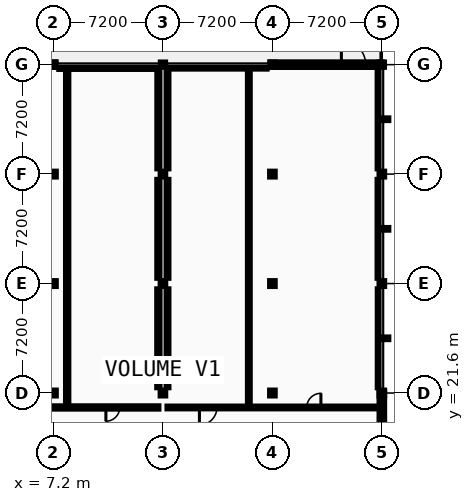
"""IFC4 building model, lengths in metres.
Left out: names, types, materials, properties, quantities, classifications, styles, units other than length and angle.
Written with IfcOpenShell. Run it as: python <this file> out.ifc"""

import sys

from ifc_helpers import new_model, si_unit, direction, frame, frame_2d, origin, origin_2d, place, context, subcontext, project, spatial, rectangle, i_section, extrude, element, fill, save


model = new_model("IFC4")
c1 = context("Model", 3, precision=1e-05, world=origin(), true_north=direction((0.0, 1.0)))
c2 = subcontext(c1, "Body", "Model", "MODEL_VIEW")
j1 = project(units=[si_unit("LENGTHUNIT", "METRE"), si_unit("PLANEANGLEUNIT", "RADIAN")], contexts=[c1])
p1 = place(None, origin())
s1 = spatial("IfcSite", under=j1, at=p1, CompositionType="ELEMENT")
p2 = place(p1, origin())
s2 = spatial("IfcBuilding", under=s1, at=p2, CompositionType="ELEMENT")
p3 = place(p2, frame((0.0, 0.0, 22.8)))
s3 = spatial("IfcBuildingStorey", under=s2, at=p3, CompositionType="ELEMENT", Elevation=22.8)
for number, where, z_axis, x_axis in (
    (1, (7.2, 21.6, 0.0), (0.0, 0.0, 1.0), (1.0, 0.0, 0.0)),
    (2, (7.2, 28.8, 0.0), (0.0, 0.0, 1.0), (1.0, 0.0, 0.0)),
    (3, (7.2, 36.0, 0.0), (0.0, 0.0, 1.0), (1.0, 0.0, 0.0)),
):
    element("IfcColumn", number, at=place(p3, frame(where, z_axis=z_axis, x_axis=x_axis)), inside=s3, PredefinedType="COLUMN", context=c2, shape_type="SweptSolid", body=[
        extrude(i_section(OverallWidth=0.3, OverallDepth=0.32, WebThickness=0.011, FlangeThickness=0.021, FilletRadius=0.027, at=origin_2d()), origin(), (0.0, 0.0, 1.0), 4.4),
    ])
p4 = place(p3, frame((7.2, 43.2, 0.0), z_axis=(0.0, 0.0, 1.0), x_axis=(1.0, 0.0, 0.0)))
e4 = element("IfcColumn", 4, at=p4, inside=s3, PredefinedType="COLUMN", context=c2, shape_type="SweptSolid", body=[
    extrude(i_section(OverallWidth=0.28, OverallDepth=0.28, WebThickness=0.01, FlangeThickness=0.018, FilletRadius=0.024, at=origin_2d()), origin(), (0.0, 0.0, 1.0), 4.4),
])
for number, where, z_axis, x_axis in (
    (5, (14.4, 21.6, 0.0), (0.0, 0.0, 1.0), (1.0, 0.0, 0.0)),
    (6, (14.4, 28.8, 0.0), (0.0, 0.0, 1.0), (1.0, 0.0, 0.0)),
    (7, (14.4, 36.0, 0.0), (0.0, 0.0, 1.0), (1.0, 0.0, 0.0)),
):
    element("IfcColumn", number, at=place(p3, frame(where, z_axis=z_axis, x_axis=x_axis)), inside=s3, PredefinedType="COLUMN", context=c2, shape_type="SweptSolid", body=[
        extrude(i_section(OverallWidth=0.3, OverallDepth=0.32, WebThickness=0.011, FlangeThickness=0.021, FilletRadius=0.027, at=origin_2d()), origin(), (0.0, 0.0, 1.0), 4.4),
    ])
p5 = place(p3, frame((14.4, 43.2, 0.0), z_axis=(0.0, 0.0, 1.0), x_axis=(1.0, 0.0, 0.0)))
e8 = element("IfcColumn", 8, at=p5, inside=s3, PredefinedType="COLUMN", context=c2, shape_type="SweptSolid", body=[
    extrude(i_section(OverallWidth=0.28, OverallDepth=0.28, WebThickness=0.01, FlangeThickness=0.018, FilletRadius=0.024, at=origin_2d()), origin(), (0.0, 0.0, 1.0), 4.4),
])
for number, where, z_axis, x_axis in (
    (9, (21.6, 21.6, 0.0), (0.0, 0.0, 1.0), (1.0, 0.0, 0.0)),
    (10, (21.6, 28.8, 0.0), (0.0, 0.0, 1.0), (1.0, 0.0, 0.0)),
    (11, (21.6, 36.0, 0.0), (0.0, 0.0, 1.0), (1.0, 0.0, 0.0)),
):
    element("IfcColumn", number, at=place(p3, frame(where, z_axis=z_axis, x_axis=x_axis)), inside=s3, PredefinedType="COLUMN", context=c2, shape_type="SweptSolid", body=[
        extrude(i_section(OverallWidth=0.3, OverallDepth=0.32, WebThickness=0.011, FlangeThickness=0.021, FilletRadius=0.027, at=origin_2d()), origin(), (0.0, 0.0, 1.0), 4.4),
    ])
p6 = place(p3, frame((21.6, 43.2, 0.0), z_axis=(0.0, 0.0, 1.0), x_axis=(1.0, 0.0, 0.0)))
e12 = element("IfcColumn", 12, at=p6, inside=s3, PredefinedType="COLUMN", context=c2, shape_type="SweptSolid", body=[
    extrude(i_section(OverallWidth=0.28, OverallDepth=0.28, WebThickness=0.01, FlangeThickness=0.018, FilletRadius=0.024, at=origin_2d()), origin(), (0.0, 0.0, 1.0), 4.4),
])
for number, where, z_axis, x_axis in (
    (13, (28.8, 21.6, 0.0), (0.0, 0.0, 1.0), (1.0, 0.0, 0.0)),
    (14, (28.8, 28.8, 0.0), (0.0, 0.0, 1.0), (1.0, 0.0, 0.0)),
    (15, (28.8, 36.0, 0.0), (0.0, 0.0, 1.0), (1.0, 0.0, 0.0)),
):
    element("IfcColumn", number, at=place(p3, frame(where, z_axis=z_axis, x_axis=x_axis)), inside=s3, PredefinedType="COLUMN", context=c2, shape_type="SweptSolid", body=[
        extrude(i_section(OverallWidth=0.3, OverallDepth=0.32, WebThickness=0.011, FlangeThickness=0.021, FilletRadius=0.027, at=origin_2d()), origin(), (0.0, 0.0, 1.0), 4.4),
    ])
p7 = place(p3, frame((28.8, 43.2, 0.0), z_axis=(0.0, 0.0, 1.0), x_axis=(1.0, 0.0, 0.0)))
e16 = element("IfcColumn", 16, at=p7, inside=s3, PredefinedType="COLUMN", context=c2, shape_type="SweptSolid", body=[
    extrude(i_section(OverallWidth=0.28, OverallDepth=0.28, WebThickness=0.01, FlangeThickness=0.018, FilletRadius=0.024, at=origin_2d()), origin(), (0.0, 0.0, 1.0), 4.4),
])
p8 = place(p3, frame((7.31, 43.2, 0.0), z_axis=(0.0, 0.0, 1.0), x_axis=(-1.0, 0.0, 0.0)))
e17 = element("IfcWall", 17, at=p8, inside=s3, PredefinedType="STANDARD", context=c2, shape_type="SweptSolid", body=[
    extrude(rectangle(XDim=7.46, YDim=0.3, at=frame_2d((3.73, 0.0))), origin(), (0.0, 0.0, 1.0), 3.915),
])
p9 = place(p3, frame((28.8, 43.2, 0.0), z_axis=(0.0, 0.0, 1.0), x_axis=(-1.0, 0.0, 0.0)))
e18 = element("IfcWall", 18, at=p9, inside=s3, PredefinedType="STANDARD", context=c2, shape_type="SweptSolid", body=[
    extrude(rectangle(XDim=7.31, YDim=0.3, at=frame_2d((3.655, 0.0))), origin(), (0.0, 0.0, 1.0), 3.915),
])
p10 = place(p9, frame((1.062, 0.0, 0.0)))
e19 = element("IfcOpeningElement", 19, at=p10, cuts=e18, PredefinedType="OPENING", context=c2, shape_type="SweptSolid", body=[
    extrude(rectangle(XDim=1.6, YDim=2.2, at=frame_2d((0.8, 1.1))), frame((0.0, 0.16, 0.0), z_axis=(0.0, -1.0, 0.0), x_axis=(1.0, 0.0, 0.0)), (0.0, 0.0, 1.0), 0.32),
])
p11 = place(p3, frame((28.8, 14.45, 0.0), z_axis=(0.0, 0.0, 1.0), x_axis=(0.0, 1.0, 0.0)))
e20 = element("IfcWall", 20, at=p11, inside=s3, PredefinedType="STANDARD", context=c2, shape_type="SweptSolid", body=[
    extrude(rectangle(XDim=7.15, YDim=0.3, at=frame_2d((3.575, 0.0))), origin(), (0.0, 0.0, 1.0), 4.215),
])
p12 = place(p3, frame((0.2, 20.65, 0.0), z_axis=(0.0, 0.0, 1.0), x_axis=(1.0, 0.0, 0.0)))
e21 = element("IfcWall", 21, at=p12, inside=s3, PredefinedType="PARTITIONING", context=c2, shape_type="SweptSolid", body=[
    extrude(rectangle(XDim=13.9, YDim=0.15, at=frame_2d((6.95, 0.0))), origin(), (0.0, 0.0, 1.0), 4.215),
])
p13 = place(p12, frame((1.97, 0.0, 0.0)))
e22 = element("IfcOpeningElement", 22, at=p13, cuts=e21, PredefinedType="OPENING", context=c2, shape_type="SweptSolid", body=[
    extrude(rectangle(XDim=0.88, YDim=2.096, at=frame_2d((0.44, 1.048))), frame((0.0, 0.085, 0.0), z_axis=(0.0, -1.0, 0.0), x_axis=(1.0, 0.0, 0.0)), (0.0, 0.0, 1.0), 0.17),
])
p14 = place(p12, frame((3.75, 0.0, 0.0)))
e23 = element("IfcOpeningElement", 23, at=p14, cuts=e21, PredefinedType="OPENING", context=c2, shape_type="SweptSolid", body=[
    extrude(rectangle(XDim=1.5, YDim=2.2, at=frame_2d((0.75, 1.1))), frame((0.0, 0.085, 0.0), z_axis=(0.0, -1.0, 0.0), x_axis=(1.0, 0.0, 0.0)), (0.0, 0.0, 1.0), 0.17),
])
p15 = place(p12, frame((10.447, 0.0, 0.0)))
e24 = element("IfcOpeningElement", 24, at=p15, cuts=e21, PredefinedType="OPENING", context=c2, shape_type="SweptSolid", body=[
    extrude(rectangle(XDim=0.906, YDim=2.096, at=frame_2d((0.453, 1.048))), frame((0.0, 0.085, 0.0), z_axis=(0.0, -1.0, 0.0), x_axis=(1.0, 0.0, 0.0)), (0.0, 0.0, 1.0), 0.17),
])
p16 = place(p3, frame((14.7, 20.65, 0.0), z_axis=(0.0, 0.0, 1.0), x_axis=(1.0, 0.0, 0.0)))
e25 = element("IfcWall", 25, at=p16, inside=s3, PredefinedType="PARTITIONING", context=c2, shape_type="SweptSolid", body=[
    extrude(rectangle(XDim=13.9, YDim=0.118, at=frame_2d((6.95, 0.0))), origin(), (0.0, 0.0, 1.0), 4.215),
])
p17 = place(p16, frame((2.1, 0.0, 0.0)))
e26 = element("IfcOpeningElement", 26, at=p17, cuts=e25, PredefinedType="OPENING", context=c2, shape_type="SweptSolid", body=[
    extrude(rectangle(XDim=1.15, YDim=2.15, at=frame_2d((0.575, 1.075))), frame((0.0, 0.069, 0.0), z_axis=(0.0, -1.0, 0.0), x_axis=(1.0, 0.0, 0.0)), (0.0, 0.0, 1.0), 0.138),
])
p18 = place(p16, frame((9.159, 0.0, 0.0)))
e27 = element("IfcOpeningElement", 27, at=p18, cuts=e25, PredefinedType="OPENING", context=c2, shape_type="SweptSolid", body=[
    extrude(rectangle(XDim=0.932, YDim=2.096, at=frame_2d((0.466, 1.048))), frame((0.0, 0.069, 0.0), z_axis=(0.0, -1.0, 0.0), x_axis=(1.0, 0.0, 0.0)), (0.0, 0.0, 1.0), 0.138),
])
p19 = place(p3, frame((7.58, 43.0, 0.0), z_axis=(0.0, 0.0, 1.0), x_axis=(1.0, 0.0, 0.0)))
e28 = element("IfcWall", 28, at=p19, inside=s3, PredefinedType="PARTITIONING", context=c2, shape_type="SweptSolid", body=[
    extrude(rectangle(XDim=6.44, YDim=0.16, at=frame_2d((3.22, 0.0))), origin(), (0.0, 0.0, 1.0), 3.915),
])
p20 = place(p3, frame((14.78, 43.0, 0.0), z_axis=(0.0, 0.0, 1.0), x_axis=(1.0, 0.0, 0.0)))
e29 = element("IfcWall", 29, at=p20, inside=s3, PredefinedType="PARTITIONING", context=c2, shape_type="SweptSolid", body=[
    extrude(rectangle(XDim=6.44, YDim=0.118, at=frame_2d((3.22, 0.0))), origin(), (0.0, 0.0, 1.0), 3.915),
])
p21 = place(p3, frame((8.1, 20.725, 0.0), z_axis=(0.0, 0.0, 1.0), x_axis=(0.0, 1.0, 0.0)))
e30 = element("IfcWall", 30, at=p21, inside=s3, PredefinedType="PARTITIONING", context=c2, shape_type="SweptSolid", body=[
    extrude(rectangle(XDim=22.195, YDim=0.15, at=frame_2d((11.097, 0.0))), origin(), (0.0, 0.0, 1.0), 4.215),
])
p22 = place(p3, frame((14.1, 21.98, 0.0), z_axis=(0.0, 0.0, 1.0), x_axis=(0.0, 1.0, 0.0)))
e31 = element("IfcWall", 31, at=p22, inside=s3, PredefinedType="PARTITIONING", context=c2, shape_type="SweptSolid", body=[
    extrude(rectangle(XDim=6.44, YDim=0.15, at=frame_2d((3.22, 0.0))), origin(), (0.0, 0.0, 1.0), 3.91),
])
p23 = place(p3, frame((14.1, 29.18, 0.0), z_axis=(0.0, 0.0, 1.0), x_axis=(0.0, 1.0, 0.0)))
e32 = element("IfcWall", 32, at=p23, inside=s3, PredefinedType="PARTITIONING", context=c2, shape_type="SweptSolid", body=[
    extrude(rectangle(XDim=6.44, YDim=0.142, at=frame_2d((3.22, 0.0))), origin(), (0.0, 0.0, 1.0), 3.91),
])
p24 = place(p3, frame((14.1, 36.38, 0.0), z_axis=(0.0, 0.0, 1.0), x_axis=(0.0, 1.0, 0.0)))
e33 = element("IfcWall", 33, at=p24, inside=s3, PredefinedType="PARTITIONING", context=c2, shape_type="SweptSolid", body=[
    extrude(rectangle(XDim=6.44, YDim=0.135, at=frame_2d((3.22, 0.0))), origin(), (0.0, 0.0, 1.0), 4.215),
])
p25 = place(p3, frame((14.7, 21.98, 0.0), z_axis=(0.0, 0.0, 1.0), x_axis=(0.0, 1.0, 0.0)))
e34 = element("IfcWall", 34, at=p25, inside=s3, PredefinedType="PARTITIONING", context=c2, shape_type="SweptSolid", body=[
    extrude(rectangle(XDim=6.44, YDim=0.118, at=frame_2d((3.22, 0.0))), origin(), (0.0, 0.0, 1.0), 4.215),
])
for number, where, z_axis, x_axis in (
    (35, (14.7, 29.18, 0.0), (0.0, 0.0, 1.0), (0.0, 1.0, 0.0)),
    (36, (14.7, 36.38, 0.0), (0.0, 0.0, 1.0), (0.0, 1.0, 0.0)),
):
    element("IfcWall", number, at=place(p3, frame(where, z_axis=z_axis, x_axis=x_axis)), inside=s3, PredefinedType="PARTITIONING", context=c2, shape_type="SweptSolid", body=[
        extrude(rectangle(XDim=6.44, YDim=0.118, at=frame_2d((3.22, 0.0))), origin(), (0.0, 0.0, 1.0), 4.215),
    ])
p26 = place(p3, frame((20.05, 20.709, 0.0), z_axis=(0.0, 0.0, 1.0), x_axis=(0.0, 1.0, 0.0)))
e37 = element("IfcWall", 37, at=p26, inside=s3, PredefinedType="PARTITIONING", context=c2, shape_type="SweptSolid", body=[
    extrude(rectangle(XDim=22.232, YDim=0.118, at=frame_2d((11.116, 0.0))), origin(), (0.0, 0.0, 1.0), 4.215),
])
p27 = place(p3, frame((28.6, 21.98, 0.0), z_axis=(0.0, 0.0, 1.0), x_axis=(0.0, 1.0, 0.0)))
e38 = element("IfcWall", 38, at=p27, inside=s3, PredefinedType="PARTITIONING", context=c2, shape_type="SweptSolid", body=[
    extrude(rectangle(XDim=6.44, YDim=0.135, at=frame_2d((3.22, 0.0))), origin(), (0.0, 0.0, 1.0), 3.9),
])
p28 = place(p3, frame((28.6, 29.18, 0.0), z_axis=(0.0, 0.0, 1.0), x_axis=(0.0, 1.0, 0.0)))
e39 = element("IfcWall", 39, at=p28, inside=s3, PredefinedType="PARTITIONING", context=c2, shape_type="SweptSolid", body=[
    extrude(rectangle(XDim=6.44, YDim=0.16, at=frame_2d((3.22, 0.0))), origin(), (0.0, 0.0, 1.0), 3.9),
])
p29 = place(p3, frame((28.6, 36.38, 0.0), z_axis=(0.0, 0.0, 1.0), x_axis=(0.0, 1.0, 0.0)))
e40 = element("IfcWall", 40, at=p29, inside=s3, PredefinedType="PARTITIONING", context=c2, shape_type="SweptSolid", body=[
    extrude(rectangle(XDim=6.44, YDim=0.15, at=frame_2d((3.22, 0.0))), origin(), (0.0, 0.0, 1.0), 3.865),
])
p30 = place(p10, origin())
e41 = element("IfcDoor", 41, at=p30, inside=s3, OperationType="DOUBLE_DOOR_SINGLE_SWING", PredefinedType="DOOR", context=c2, shape_type="SweptSolid", body=[
    extrude(rectangle(XDim=1.6, YDim=2.2, at=frame_2d((0.8, 1.1))), frame((0.0, 0.025, 0.0), z_axis=(0.0, -1.0, 0.0), x_axis=(1.0, 0.0, 0.0)), (0.0, 0.0, 1.0), 0.05),
])
fill(e19, e41)
p31 = place(p17, frame((1.15, 0.0, 0.0), z_axis=(0.0, 0.0, 1.0), x_axis=(-1.0, 0.0, 0.0)))
e42 = element("IfcDoor", 42, at=p31, inside=s3, OperationType="SINGLE_SWING_LEFT", PredefinedType="DOOR", context=c2, shape_type="SweptSolid", body=[
    extrude(rectangle(XDim=1.15, YDim=2.15, at=frame_2d((0.575, 1.075))), frame((0.0, 0.025, 0.0), z_axis=(0.0, -1.0, 0.0), x_axis=(1.0, 0.0, 0.0)), (0.0, 0.0, 1.0), 0.05),
])
fill(e26, e42)
p32 = place(p15, frame((0.906, 0.0, 0.0), z_axis=(0.0, 0.0, 1.0), x_axis=(-1.0, 0.0, 0.0)))
e43 = element("IfcDoor", 43, at=p32, inside=s3, OperationType="SINGLE_SWING_LEFT", PredefinedType="DOOR", context=c2, shape_type="SweptSolid", body=[
    extrude(rectangle(XDim=0.906, YDim=2.096, at=frame_2d((0.453, 1.048))), frame((0.0, 0.025, 0.0), z_axis=(0.0, -1.0, 0.0), x_axis=(1.0, 0.0, 0.0)), (0.0, 0.0, 1.0), 0.05),
])
fill(e24, e43)
p33 = place(p18, frame((0.932, 0.0, 0.0), z_axis=(0.0, 0.0, 1.0), x_axis=(-1.0, 0.0, 0.0)))
e44 = element("IfcDoor", 44, at=p33, inside=s3, OperationType="SINGLE_SWING_RIGHT", PredefinedType="DOOR", context=c2, shape_type="SweptSolid", body=[
    extrude(rectangle(XDim=0.932, YDim=2.096, at=frame_2d((0.466, 1.048))), frame((0.0, 0.025, 0.0), z_axis=(0.0, -1.0, 0.0), x_axis=(1.0, 0.0, 0.0)), (0.0, 0.0, 1.0), 0.05),
])
fill(e27, e44)
save(model, sys.argv[1])
